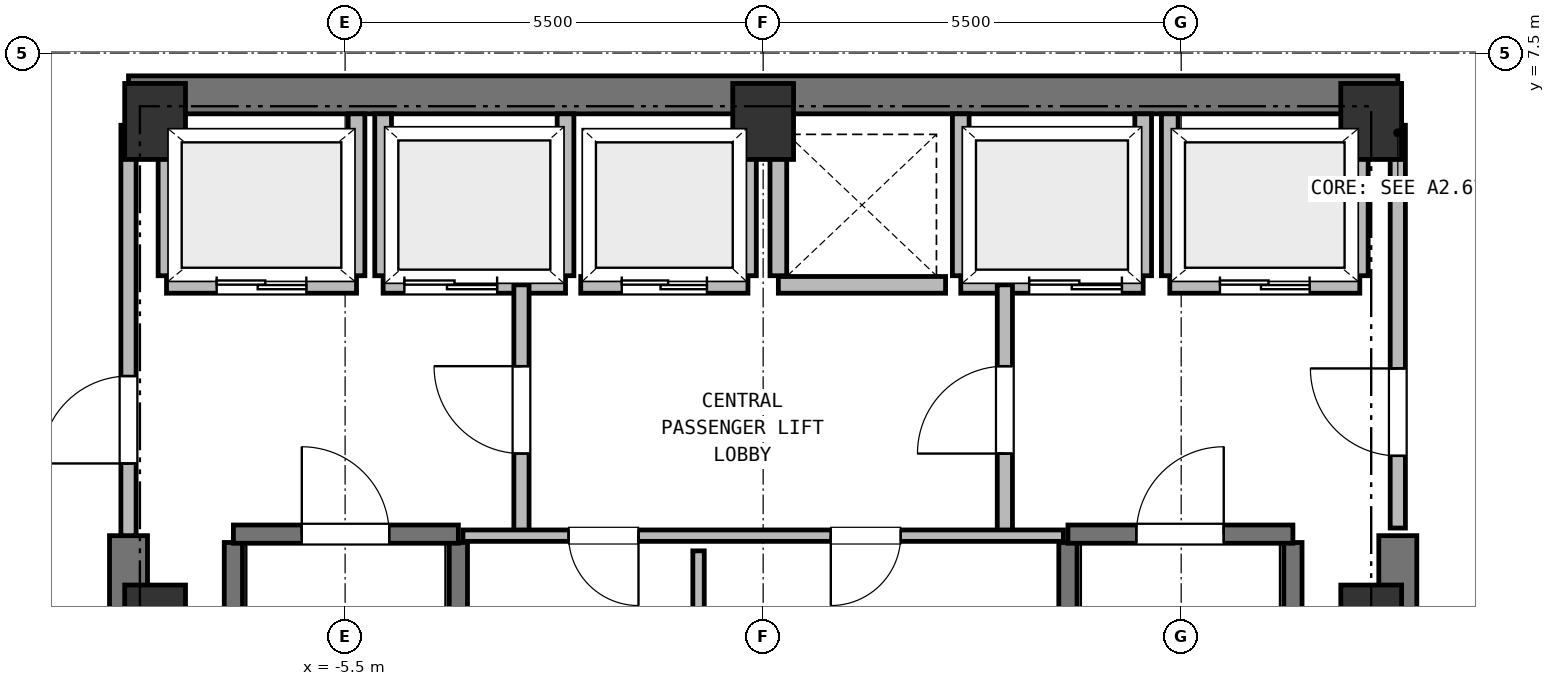
"""IFC4 building model, lengths in metres.
Left out: names, types, materials, properties, quantities, classifications, styles, units other than length and angle.
Written with IfcOpenShell. Run it as: python <this file> out.ifc"""

import sys

from ifc_helpers import new_model, si_unit, direction, frame, frame_2d, origin, origin_2d, place, context, subcontext, project, spatial, rectangle, extrude, element, fill, save


model = new_model("IFC4")
c1 = context("Model", 3, precision=1e-05, world=origin(), true_north=direction((0.0, 1.0)))
c2 = subcontext(c1, "Body", "Model", "MODEL_VIEW")
j1 = project(units=[si_unit("LENGTHUNIT", "METRE"), si_unit("PLANEANGLEUNIT", "RADIAN")], contexts=[c1])
p1 = place(None, origin())
s1 = spatial("IfcSite", under=j1, at=p1, CompositionType="ELEMENT")
p2 = place(p1, origin())
s2 = spatial("IfcBuilding", under=s1, at=p2, CompositionType="ELEMENT")
p3 = place(p2, frame((0.0, 0.0, 251.15)))
s3 = spatial("IfcBuildingStorey", under=s2, at=p3, CompositionType="ELEMENT", Elevation=251.15)
for number, where, z_axis, x_axis in (
    (1, (8.0, 0.0, 0.0), (0.0, 0.0, 1.0), (1.0, 0.0, 0.0)),
    (2, (8.0, 6.6, 0.0), (0.0, 0.0, 1.0), (1.0, 0.0, 0.0)),
    (3, (0.0, 6.6, 0.0), (0.0, 0.0, 1.0), (1.0, 0.0, 0.0)),
    (4, (-8.0, 6.6, 0.0), (0.0, 0.0, 1.0), (1.0, 0.0, 0.0)),
    (5, (-8.0, 0.0, 0.0), (0.0, 0.0, 1.0), (1.0, 0.0, 0.0)),
):
    element("IfcColumn", number, at=place(p3, frame(where, z_axis=z_axis, x_axis=x_axis)), inside=s3, PredefinedType="COLUMN", context=c2, shape_type="SweptSolid", body=[
        extrude(rectangle(XDim=0.8, YDim=1.0, at=origin_2d()), origin(), (0.0, 0.0, 1.0), 3.8),
    ])
p4 = place(p3, frame((-8.35, 6.95, 0.0), z_axis=(0.0, 0.0, 1.0), x_axis=(1.0, 0.0, 0.0)))
e6 = element("IfcWall", 6, at=p4, inside=s3, PredefinedType="SHEAR", context=c2, shape_type="SweptSolid", body=[
    extrude(rectangle(XDim=16.7, YDim=0.5, at=frame_2d((8.35, 0.0))), origin(), (0.0, 0.0, 1.0), 3.49),
])
for number, where, z_axis, x_axis in (
    (7, (-8.35, -6.95, 0.0), (0.0, 0.0, 1.0), (0.0, 1.0, 0.0)),
    (8, (8.35, -6.95, 0.0), (0.0, 0.0, 1.0), (0.0, 1.0, 0.0)),
):
    element("IfcWall", number, at=place(p3, frame(where, z_axis=z_axis, x_axis=x_axis)), inside=s3, PredefinedType="SHEAR", context=c2, shape_type="SweptSolid", body=[
        extrude(rectangle(XDim=8.1, YDim=0.5, at=frame_2d((4.05, 0.0))), origin(), (0.0, 0.0, 1.0), 3.49),
    ])
for number, where, z_axis, x_axis in (
    (9, (-6.97, -6.16, 0.0), (0.0, 0.0, 1.0), (0.0, 1.0, 0.0)),
    (10, (-4.01, -6.16, 0.0), (0.0, 0.0, 1.0), (0.0, 1.0, 0.0)),
):
    element("IfcWall", number, at=place(p3, frame(where, z_axis=z_axis, x_axis=x_axis)), inside=s3, PredefinedType="SHEAR", context=c2, shape_type="SweptSolid", body=[
        extrude(rectangle(XDim=7.22, YDim=0.24, at=frame_2d((3.61, 0.0))), origin(), (0.0, 0.0, 1.0), 3.49),
    ])
p5 = place(p3, frame((-6.97, 1.17, 0.0), z_axis=(0.0, 0.0, 1.0), x_axis=(1.0, 0.0, 0.0)))
e11 = element("IfcWall", 11, at=p5, inside=s3, PredefinedType="SHEAR", context=c2, shape_type="SweptSolid", body=[
    extrude(rectangle(XDim=2.96, YDim=0.24, at=frame_2d((1.48, 0.0))), origin(), (0.0, 0.0, 1.0), 3.49),
])
p6 = place(p5, frame((0.9, 0.0, 0.0)))
e12 = element("IfcOpeningElement", 12, at=p6, cuts=e11, PredefinedType="OPENING", context=c2, shape_type="SweptSolid", body=[
    extrude(rectangle(XDim=1.15, YDim=2.15, at=frame_2d((0.575, 1.075))), frame((0.0, 0.13, 0.0), z_axis=(0.0, -1.0, 0.0), x_axis=(1.0, 0.0, 0.0)), (0.0, 0.0, 1.0), 0.26),
])
for number, where, z_axis, x_axis in (
    (13, (4.01, -6.16, 0.0), (0.0, 0.0, 1.0), (0.0, 1.0, 0.0)),
    (14, (6.97, -6.16, 0.0), (0.0, 0.0, 1.0), (0.0, 1.0, 0.0)),
):
    element("IfcWall", number, at=place(p3, frame(where, z_axis=z_axis, x_axis=x_axis)), inside=s3, PredefinedType="SHEAR", context=c2, shape_type="SweptSolid", body=[
        extrude(rectangle(XDim=7.22, YDim=0.24, at=frame_2d((3.61, 0.0))), origin(), (0.0, 0.0, 1.0), 3.49),
    ])
p7 = place(p3, frame((4.01, 1.17, 0.0), z_axis=(0.0, 0.0, 1.0), x_axis=(1.0, 0.0, 0.0)))
e15 = element("IfcWall", 15, at=p7, inside=s3, PredefinedType="SHEAR", context=c2, shape_type="SweptSolid", body=[
    extrude(rectangle(XDim=2.96, YDim=0.24, at=frame_2d((1.48, 0.0))), origin(), (0.0, 0.0, 1.0), 3.49),
])
p8 = place(p7, frame((0.9, 0.0, 0.0)))
e16 = element("IfcOpeningElement", 16, at=p8, cuts=e15, PredefinedType="OPENING", context=c2, shape_type="SweptSolid", body=[
    extrude(rectangle(XDim=1.15, YDim=2.15, at=frame_2d((0.575, 1.075))), frame((0.0, 0.13, 0.0), z_axis=(0.0, -1.0, 0.0), x_axis=(1.0, 0.0, 0.0)), (0.0, 0.0, 1.0), 0.26),
])
p9 = place(p3, frame((-7.85, 4.45, 0.0), z_axis=(0.0, 0.0, 1.0), x_axis=(1.0, 0.0, 0.0)))
e17 = element("IfcWall", 17, at=p9, inside=s3, PredefinedType="PARTITIONING", context=c2, shape_type="SweptSolid", body=[
    extrude(rectangle(XDim=2.5, YDim=0.22, at=frame_2d((1.25, 0.0))), origin(), (0.0, 0.0, 1.0), 3.49),
])
p10 = place(p9, frame((0.66, 0.0, 0.0)))
e18 = element("IfcOpeningElement", 18, at=p10, cuts=e17, PredefinedType="OPENING", context=c2, shape_type="SweptSolid", body=[
    extrude(rectangle(XDim=1.18, YDim=2.15, at=frame_2d((0.59, 1.075))), frame((0.0, 0.12, 0.0), z_axis=(0.0, -1.0, 0.0), x_axis=(1.0, 0.0, 0.0)), (0.0, 0.0, 1.0), 0.24),
])
p11 = place(p3, frame((-7.85, 4.57, 0.0), z_axis=(0.0, 0.0, 1.0), x_axis=(0.0, 1.0, 0.0)))
e19 = element("IfcWall", 19, at=p11, inside=s3, PredefinedType="PARTITIONING", context=c2, shape_type="SweptSolid", body=[
    extrude(rectangle(XDim=2.13, YDim=0.22, at=frame_2d((1.065, 0.0))), origin(), (0.0, 0.0, 1.0), 3.12),
])
p12 = place(p3, frame((-5.35, 4.57, 0.0), z_axis=(0.0, 0.0, 1.0), x_axis=(0.0, 1.0, 0.0)))
e20 = element("IfcWall", 20, at=p12, inside=s3, PredefinedType="PARTITIONING", context=c2, shape_type="SweptSolid", body=[
    extrude(rectangle(XDim=2.13, YDim=0.22, at=frame_2d((1.065, 0.0))), origin(), (0.0, 0.0, 1.0), 3.49),
])
p13 = place(p3, frame((5.35, 4.45, 0.0), z_axis=(0.0, 0.0, 1.0), x_axis=(1.0, 0.0, 0.0)))
e21 = element("IfcWall", 21, at=p13, inside=s3, PredefinedType="PARTITIONING", context=c2, shape_type="SweptSolid", body=[
    extrude(rectangle(XDim=2.5, YDim=0.22, at=frame_2d((1.25, 0.0))), origin(), (0.0, 0.0, 1.0), 3.49),
])
p14 = place(p13, frame((0.66, 0.0, 0.0)))
e22 = element("IfcOpeningElement", 22, at=p14, cuts=e21, PredefinedType="OPENING", context=c2, shape_type="SweptSolid", body=[
    extrude(rectangle(XDim=1.18, YDim=2.15, at=frame_2d((0.59, 1.075))), frame((0.0, 0.12, 0.0), z_axis=(0.0, -1.0, 0.0), x_axis=(1.0, 0.0, 0.0)), (0.0, 0.0, 1.0), 0.24),
])
p15 = place(p3, frame((5.35, 4.57, 0.0), z_axis=(0.0, 0.0, 1.0), x_axis=(0.0, 1.0, 0.0)))
e23 = element("IfcWall", 23, at=p15, inside=s3, PredefinedType="PARTITIONING", context=c2, shape_type="SweptSolid", body=[
    extrude(rectangle(XDim=2.13, YDim=0.22, at=frame_2d((1.065, 0.0))), origin(), (0.0, 0.0, 1.0), 3.49),
])
p16 = place(p3, frame((7.85, 4.57, 0.0), z_axis=(0.0, 0.0, 1.0), x_axis=(0.0, 1.0, 0.0)))
e24 = element("IfcWall", 24, at=p16, inside=s3, PredefinedType="PARTITIONING", context=c2, shape_type="SweptSolid", body=[
    extrude(rectangle(XDim=2.13, YDim=0.22, at=frame_2d((1.065, 0.0))), origin(), (0.0, 0.0, 1.0), 3.12),
])
p17 = place(p3, frame((-5.0, 4.45, 0.0), z_axis=(0.0, 0.0, 1.0), x_axis=(1.0, 0.0, 0.0)))
e25 = element("IfcWall", 25, at=p17, inside=s3, PredefinedType="PARTITIONING", context=c2, shape_type="SweptSolid", body=[
    extrude(rectangle(XDim=2.4, YDim=0.22, at=frame_2d((1.2, 0.0))), origin(), (0.0, 0.0, 1.0), 3.49),
])
p18 = place(p17, frame((0.28, 0.0, 0.0)))
e26 = element("IfcOpeningElement", 26, at=p18, cuts=e25, PredefinedType="OPENING", context=c2, shape_type="SweptSolid", body=[
    extrude(rectangle(XDim=1.22, YDim=2.15, at=frame_2d((0.61, 1.075))), frame((0.0, 0.12, 0.0), z_axis=(0.0, -1.0, 0.0), x_axis=(1.0, 0.0, 0.0)), (0.0, 0.0, 1.0), 0.24),
])
for number, where, z_axis, x_axis in (
    (27, (-5.0, 4.57, 0.0), (0.0, 0.0, 1.0), (0.0, 1.0, 0.0)),
    (28, (-2.6, 4.57, 0.0), (0.0, 0.0, 1.0), (0.0, 1.0, 0.0)),
):
    element("IfcWall", number, at=place(p3, frame(where, z_axis=z_axis, x_axis=x_axis)), inside=s3, PredefinedType="PARTITIONING", context=c2, shape_type="SweptSolid", body=[
        extrude(rectangle(XDim=2.13, YDim=0.22, at=frame_2d((1.065, 0.0))), origin(), (0.0, 0.0, 1.0), 3.49),
    ])
p19 = place(p3, frame((2.6, 4.45, 0.0), z_axis=(0.0, 0.0, 1.0), x_axis=(1.0, 0.0, 0.0)))
e29 = element("IfcWall", 29, at=p19, inside=s3, PredefinedType="PARTITIONING", context=c2, shape_type="SweptSolid", body=[
    extrude(rectangle(XDim=2.4, YDim=0.22, at=frame_2d((1.2, 0.0))), origin(), (0.0, 0.0, 1.0), 3.49),
])
p20 = place(p19, frame((0.9, 0.0, 0.0)))
e30 = element("IfcOpeningElement", 30, at=p20, cuts=e29, PredefinedType="OPENING", context=c2, shape_type="SweptSolid", body=[
    extrude(rectangle(XDim=1.22, YDim=2.15, at=frame_2d((0.61, 1.075))), frame((0.0, 0.12, 0.0), z_axis=(0.0, -1.0, 0.0), x_axis=(1.0, 0.0, 0.0)), (0.0, 0.0, 1.0), 0.24),
])
for number, where, z_axis, x_axis in (
    (31, (2.6, 4.57, 0.0), (0.0, 0.0, 1.0), (0.0, 1.0, 0.0)),
    (32, (5.0, 4.57, 0.0), (0.0, 0.0, 1.0), (0.0, 1.0, 0.0)),
):
    element("IfcWall", number, at=place(p3, frame(where, z_axis=z_axis, x_axis=x_axis)), inside=s3, PredefinedType="PARTITIONING", context=c2, shape_type="SweptSolid", body=[
        extrude(rectangle(XDim=2.13, YDim=0.22, at=frame_2d((1.065, 0.0))), origin(), (0.0, 0.0, 1.0), 3.49),
    ])
p21 = place(p3, frame((-2.4, 4.45, 0.0), z_axis=(0.0, 0.0, 1.0), x_axis=(1.0, 0.0, 0.0)))
e33 = element("IfcWall", 33, at=p21, inside=s3, PredefinedType="PARTITIONING", context=c2, shape_type="SweptSolid", body=[
    extrude(rectangle(XDim=2.2, YDim=0.22, at=frame_2d((1.1, 0.0))), origin(), (0.0, 0.0, 1.0), 3.49),
])
p22 = place(p21, frame((0.54, 0.0, 0.0)))
e34 = element("IfcOpeningElement", 34, at=p22, cuts=e33, PredefinedType="OPENING", context=c2, shape_type="SweptSolid", body=[
    extrude(rectangle(XDim=1.12, YDim=2.15, at=frame_2d((0.56, 1.075))), frame((0.0, 0.12, 0.0), z_axis=(0.0, -1.0, 0.0), x_axis=(1.0, 0.0, 0.0)), (0.0, 0.0, 1.0), 0.24),
])
p23 = place(p3, frame((-0.2, 4.57, 0.0), z_axis=(0.0, 0.0, 1.0), x_axis=(0.0, 1.0, 0.0)))
e35 = element("IfcWall", 35, at=p23, inside=s3, PredefinedType="PARTITIONING", context=c2, shape_type="SweptSolid", body=[
    extrude(rectangle(XDim=2.13, YDim=0.22, at=frame_2d((1.065, 0.0))), origin(), (0.0, 0.0, 1.0), 3.49),
])
p24 = place(p3, frame((0.2, 4.45, 0.0), z_axis=(0.0, 0.0, 1.0), x_axis=(1.0, 0.0, 0.0)))
e36 = element("IfcWall", 36, at=p24, inside=s3, PredefinedType="PARTITIONING", context=c2, shape_type="SweptSolid", body=[
    extrude(rectangle(XDim=2.2, YDim=0.22, at=frame_2d((1.1, 0.0))), origin(), (0.0, 0.0, 1.0), 3.49),
])
p25 = place(p3, frame((0.2, 4.57, 0.0), z_axis=(0.0, 0.0, 1.0), x_axis=(0.0, 1.0, 0.0)))
e37 = element("IfcWall", 37, at=p25, inside=s3, PredefinedType="PARTITIONING", context=c2, shape_type="SweptSolid", body=[
    extrude(rectangle(XDim=2.13, YDim=0.22, at=frame_2d((1.065, 0.0))), origin(), (0.0, 0.0, 1.0), 3.49),
])
p26 = place(p3, frame((-3.18, 1.15, 0.0), z_axis=(0.0, 0.0, 1.0), x_axis=(0.0, 1.0, 0.0)))
e38 = element("IfcWall", 38, at=p26, inside=s3, PredefinedType="PARTITIONING", context=c2, shape_type="SweptSolid", body=[
    extrude(rectangle(XDim=3.3, YDim=0.2, at=frame_2d((1.65, 0.0))), origin(), (0.0, 0.0, 1.0), 3.49),
])
p27 = place(p26, frame((1.08, 0.0, 0.0)))
e39 = element("IfcOpeningElement", 39, at=p27, cuts=e38, PredefinedType="OPENING", context=c2, shape_type="SweptSolid", body=[
    extrude(rectangle(XDim=1.15, YDim=2.15, at=frame_2d((0.575, 1.075))), frame((0.0, 0.11, 0.0), z_axis=(0.0, -1.0, 0.0), x_axis=(1.0, 0.0, 0.0)), (0.0, 0.0, 1.0), 0.22),
])
p28 = place(p3, frame((3.18, 1.15, 0.0), z_axis=(0.0, 0.0, 1.0), x_axis=(0.0, 1.0, 0.0)))
e40 = element("IfcWall", 40, at=p28, inside=s3, PredefinedType="PARTITIONING", context=c2, shape_type="SweptSolid", body=[
    extrude(rectangle(XDim=3.3, YDim=0.2, at=frame_2d((1.65, 0.0))), origin(), (0.0, 0.0, 1.0), 3.49),
])
p29 = place(p28, frame((1.08, 0.0, 0.0)))
e41 = element("IfcOpeningElement", 41, at=p29, cuts=e40, PredefinedType="OPENING", context=c2, shape_type="SweptSolid", body=[
    extrude(rectangle(XDim=1.15, YDim=2.15, at=frame_2d((0.575, 1.075))), frame((0.0, 0.11, 0.0), z_axis=(0.0, -1.0, 0.0), x_axis=(1.0, 0.0, 0.0)), (0.0, 0.0, 1.0), 0.22),
])
p30 = place(p3, frame((-8.35, 1.15, 0.0), z_axis=(0.0, 0.0, 1.0), x_axis=(0.0, 1.0, 0.0)))
e42 = element("IfcWall", 42, at=p30, inside=s3, PredefinedType="PARTITIONING", context=c2, shape_type="SweptSolid", body=[
    extrude(rectangle(XDim=5.4, YDim=0.2, at=frame_2d((2.7, 0.0))), origin(), (0.0, 0.0, 1.0), 3.49),
])
p31 = place(p30, frame((0.95, 0.0, 0.0)))
e43 = element("IfcOpeningElement", 43, at=p31, cuts=e42, PredefinedType="OPENING", context=c2, shape_type="SweptSolid", body=[
    extrude(rectangle(XDim=1.15, YDim=2.15, at=frame_2d((0.575, 1.075))), frame((0.0, 0.11, 0.0), z_axis=(0.0, -1.0, 0.0), x_axis=(1.0, 0.0, 0.0)), (0.0, 0.0, 1.0), 0.22),
])
p32 = place(p3, frame((8.35, 1.25, 0.0), z_axis=(0.0, 0.0, 1.0), x_axis=(0.0, 1.0, 0.0)))
e44 = element("IfcWall", 44, at=p32, inside=s3, PredefinedType="PARTITIONING", context=c2, shape_type="SweptSolid", body=[
    extrude(rectangle(XDim=5.3, YDim=0.2, at=frame_2d((2.65, 0.0))), origin(), (0.0, 0.0, 1.0), 3.49),
])
p33 = place(p32, frame((0.95, 0.0, 0.0)))
e45 = element("IfcOpeningElement", 45, at=p33, cuts=e44, PredefinedType="OPENING", context=c2, shape_type="SweptSolid", body=[
    extrude(rectangle(XDim=1.15, YDim=2.15, at=frame_2d((0.575, 1.075))), frame((0.0, 0.11, 0.0), z_axis=(0.0, -1.0, 0.0), x_axis=(1.0, 0.0, 0.0)), (0.0, 0.0, 1.0), 0.22),
])
p34 = place(p3, frame((3.95, 1.15, 0.0), z_axis=(0.0, 0.0, 1.0), x_axis=(-1.0, 0.0, 0.0)))
e46 = element("IfcWall", 46, at=p34, inside=s3, PredefinedType="PARTITIONING", context=c2, shape_type="SweptSolid", body=[
    extrude(rectangle(XDim=7.9, YDim=0.15, at=frame_2d((3.95, 0.0))), origin(), (0.0, 0.0, 1.0), 3.49),
])
p35 = place(p34, frame((5.59, 0.0, 0.0)))
e47 = element("IfcOpeningElement", 47, at=p35, cuts=e46, PredefinedType="OPENING", context=c2, shape_type="SweptSolid", body=[
    extrude(rectangle(XDim=0.92, YDim=2.05, at=frame_2d((0.46, 1.025))), frame((0.0, 0.085, 0.0), z_axis=(0.0, -1.0, 0.0), x_axis=(1.0, 0.0, 0.0)), (0.0, 0.0, 1.0), 0.17),
])
p36 = place(p34, frame((2.14, 0.0, 0.0)))
e48 = element("IfcOpeningElement", 48, at=p36, cuts=e46, PredefinedType="OPENING", context=c2, shape_type="SweptSolid", body=[
    extrude(rectangle(XDim=0.92, YDim=2.05, at=frame_2d((0.46, 1.025))), frame((0.0, 0.085, 0.0), z_axis=(0.0, -1.0, 0.0), x_axis=(1.0, 0.0, 0.0)), (0.0, 0.0, 1.0), 0.17),
])
p37 = place(p3, frame((-0.85, -6.58, 0.0), z_axis=(0.0, 0.0, 1.0), x_axis=(0.0, 1.0, 0.0)))
e49 = element("IfcWall", 49, at=p37, inside=s3, PredefinedType="PARTITIONING", context=c2, shape_type="SweptSolid", body=[
    extrude(rectangle(XDim=7.53, YDim=0.15, at=frame_2d((3.765, 0.0))), origin(), (0.0, 0.0, 1.0), 3.49),
])
for number, where, z_axis, x_axis in (
    (50, (8.648, 9.171, 0.0), (0.0, 0.0, 1.0), (0.69, -0.724, 0.0)),
    (51, (-10.422, 7.309, 0.0), (0.0, 0.0, 1.0), (0.69, 0.724, 0.0)),
):
    element("IfcWall", number, at=place(p3, frame(where, z_axis=z_axis, x_axis=x_axis)), inside=s3, PredefinedType="PARTITIONING", context=c2, shape_type="SweptSolid", body=[
        extrude(rectangle(XDim=2.572, YDim=0.15, at=frame_2d((1.286, 0.0))), origin(), (0.0, 0.0, 1.0), 3.49),
    ])
p38 = place(p6, origin())
e52 = element("IfcDoor", 52, at=p38, inside=s3, OperationType="SINGLE_SWING_LEFT", PredefinedType="DOOR", context=c2, shape_type="SweptSolid", body=[
    extrude(rectangle(XDim=1.15, YDim=2.15, at=frame_2d((0.575, 1.075))), frame((0.0, 0.025, 0.0), z_axis=(0.0, -1.0, 0.0), x_axis=(1.0, 0.0, 0.0)), (0.0, 0.0, 1.0), 0.05),
])
fill(e12, e52)
p39 = place(p8, origin())
e53 = element("IfcDoor", 53, at=p39, inside=s3, OperationType="SINGLE_SWING_RIGHT", PredefinedType="DOOR", context=c2, shape_type="SweptSolid", body=[
    extrude(rectangle(XDim=1.15, YDim=2.15, at=frame_2d((0.575, 1.075))), frame((0.0, 0.025, 0.0), z_axis=(0.0, -1.0, 0.0), x_axis=(1.0, 0.0, 0.0)), (0.0, 0.0, 1.0), 0.05),
])
fill(e16, e53)
p40 = place(p10, origin())
e54 = element("IfcDoor", 54, at=p40, inside=s3, OperationType="DOUBLE_DOOR_SLIDING", PredefinedType="DOOR", context=c2, shape_type="SweptSolid", body=[
    extrude(rectangle(XDim=1.18, YDim=2.15, at=frame_2d((0.59, 1.075))), frame((0.0, 0.025, 0.0), z_axis=(0.0, -1.0, 0.0), x_axis=(1.0, 0.0, 0.0)), (0.0, 0.0, 1.0), 0.05),
])
fill(e18, e54)
p41 = place(p14, origin())
e55 = element("IfcDoor", 55, at=p41, inside=s3, OperationType="DOUBLE_DOOR_SLIDING", PredefinedType="DOOR", context=c2, shape_type="SweptSolid", body=[
    extrude(rectangle(XDim=1.18, YDim=2.15, at=frame_2d((0.59, 1.075))), frame((0.0, 0.025, 0.0), z_axis=(0.0, -1.0, 0.0), x_axis=(1.0, 0.0, 0.0)), (0.0, 0.0, 1.0), 0.05),
])
fill(e22, e55)
p42 = place(p18, origin())
e56 = element("IfcDoor", 56, at=p42, inside=s3, OperationType="DOUBLE_DOOR_SLIDING", PredefinedType="DOOR", context=c2, shape_type="SweptSolid", body=[
    extrude(rectangle(XDim=1.22, YDim=2.15, at=frame_2d((0.61, 1.075))), frame((0.0, 0.025, 0.0), z_axis=(0.0, -1.0, 0.0), x_axis=(1.0, 0.0, 0.0)), (0.0, 0.0, 1.0), 0.05),
])
fill(e26, e56)
p43 = place(p20, origin())
e57 = element("IfcDoor", 57, at=p43, inside=s3, OperationType="DOUBLE_DOOR_SLIDING", PredefinedType="DOOR", context=c2, shape_type="SweptSolid", body=[
    extrude(rectangle(XDim=1.22, YDim=2.15, at=frame_2d((0.61, 1.075))), frame((0.0, 0.025, 0.0), z_axis=(0.0, -1.0, 0.0), x_axis=(1.0, 0.0, 0.0)), (0.0, 0.0, 1.0), 0.05),
])
fill(e30, e57)
p44 = place(p22, origin())
e58 = element("IfcDoor", 58, at=p44, inside=s3, OperationType="DOUBLE_DOOR_SLIDING", PredefinedType="DOOR", context=c2, shape_type="SweptSolid", body=[
    extrude(rectangle(XDim=1.12, YDim=2.15, at=frame_2d((0.56, 1.075))), frame((0.0, 0.025, 0.0), z_axis=(0.0, -1.0, 0.0), x_axis=(1.0, 0.0, 0.0)), (0.0, 0.0, 1.0), 0.05),
])
fill(e34, e58)
p45 = place(p27, origin())
e59 = element("IfcDoor", 59, at=p45, inside=s3, OperationType="SINGLE_SWING_RIGHT", PredefinedType="DOOR", context=c2, shape_type="SweptSolid", body=[
    extrude(rectangle(XDim=1.15, YDim=2.15, at=frame_2d((0.575, 1.075))), frame((0.0, 0.025, 0.0), z_axis=(0.0, -1.0, 0.0), x_axis=(1.0, 0.0, 0.0)), (0.0, 0.0, 1.0), 0.05),
])
fill(e39, e59)
p46 = place(p29, origin())
e60 = element("IfcDoor", 60, at=p46, inside=s3, OperationType="SINGLE_SWING_LEFT", PredefinedType="DOOR", context=c2, shape_type="SweptSolid", body=[
    extrude(rectangle(XDim=1.15, YDim=2.15, at=frame_2d((0.575, 1.075))), frame((0.0, 0.025, 0.0), z_axis=(0.0, -1.0, 0.0), x_axis=(1.0, 0.0, 0.0)), (0.0, 0.0, 1.0), 0.05),
])
fill(e41, e60)
p47 = place(p31, origin())
e61 = element("IfcDoor", 61, at=p47, inside=s3, OperationType="SINGLE_SWING_LEFT", PredefinedType="DOOR", context=c2, shape_type="SweptSolid", body=[
    extrude(rectangle(XDim=1.15, YDim=2.15, at=frame_2d((0.575, 1.075))), frame((0.0, 0.025, 0.0), z_axis=(0.0, -1.0, 0.0), x_axis=(1.0, 0.0, 0.0)), (0.0, 0.0, 1.0), 0.05),
])
fill(e43, e61)
p48 = place(p33, origin())
e62 = element("IfcDoor", 62, at=p48, inside=s3, OperationType="SINGLE_SWING_RIGHT", PredefinedType="DOOR", context=c2, shape_type="SweptSolid", body=[
    extrude(rectangle(XDim=1.15, YDim=2.15, at=frame_2d((0.575, 1.075))), frame((0.0, 0.025, 0.0), z_axis=(0.0, -1.0, 0.0), x_axis=(1.0, 0.0, 0.0)), (0.0, 0.0, 1.0), 0.05),
])
fill(e45, e62)
p49 = place(p35, origin())
e63 = element("IfcDoor", 63, at=p49, inside=s3, OperationType="SINGLE_SWING_LEFT", PredefinedType="DOOR", context=c2, shape_type="SweptSolid", body=[
    extrude(rectangle(XDim=0.92, YDim=2.05, at=frame_2d((0.46, 1.025))), frame((0.0, 0.025, 0.0), z_axis=(0.0, -1.0, 0.0), x_axis=(1.0, 0.0, 0.0)), (0.0, 0.0, 1.0), 0.05),
])
fill(e47, e63)
p50 = place(p36, origin())
e64 = element("IfcDoor", 64, at=p50, inside=s3, OperationType="SINGLE_SWING_RIGHT", PredefinedType="DOOR", context=c2, shape_type="SweptSolid", body=[
    extrude(rectangle(XDim=0.92, YDim=2.05, at=frame_2d((0.46, 1.025))), frame((0.0, 0.025, 0.0), z_axis=(0.0, -1.0, 0.0), x_axis=(1.0, 0.0, 0.0)), (0.0, 0.0, 1.0), 0.05),
])
fill(e48, e64)
save(model, sys.argv[1])
